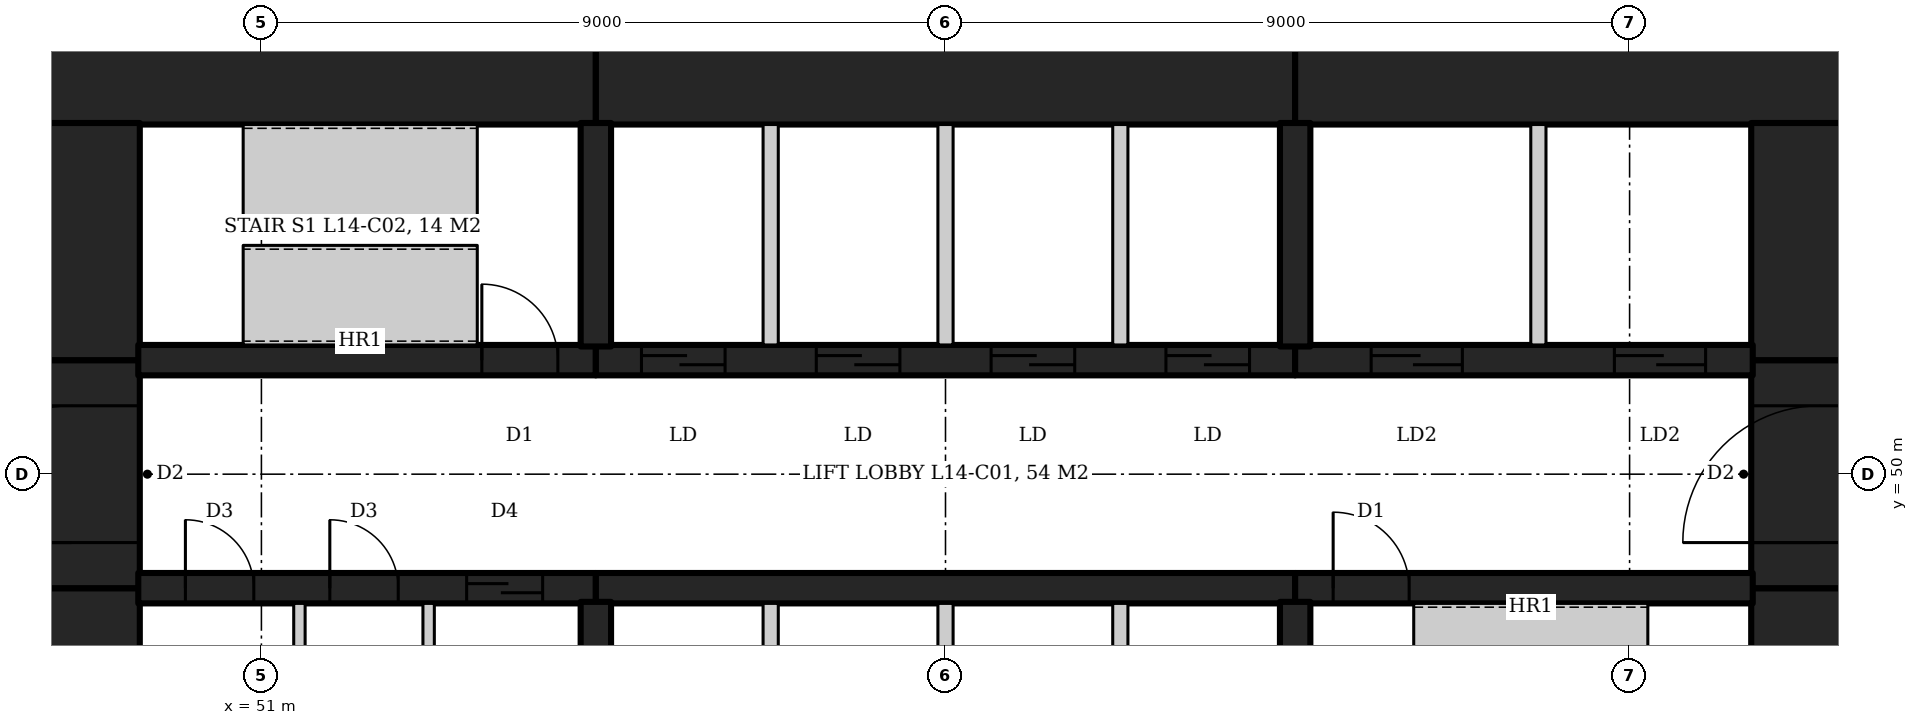
"""IFC4 building model, lengths in metres.
Left out: names, types, materials, properties, quantities, classifications, styles, units other than length and angle.
Written with IfcOpenShell. Run it as: python <this file> out.ifc"""

import sys

from ifc_helpers import new_model, si_unit, direction, frame, frame_2d, origin, place, context, subcontext, project, spatial, rectangle, extrude, element, fill, save


model = new_model("IFC4")
c1 = context("Model", 3, precision=1e-05, world=origin(), true_north=direction((0.0, 1.0)))
c2 = subcontext(c1, "Body", "Model", "MODEL_VIEW")
j1 = project(units=[si_unit("LENGTHUNIT", "METRE"), si_unit("PLANEANGLEUNIT", "RADIAN")], contexts=[c1])
p1 = place(None, origin())
s1 = spatial("IfcSite", under=j1, at=p1, CompositionType="ELEMENT")
p2 = place(p1, origin())
s2 = spatial("IfcBuilding", under=s1, at=p2, CompositionType="ELEMENT")
p3 = place(p2, frame((0.0, 0.0, 68.0)))
s3 = spatial("IfcBuildingStorey", under=s2, at=p3, CompositionType="ELEMENT", Elevation=68.0)
p4 = place(p3, frame((47.6, 55.5, 0.0), z_axis=(0.0, 0.0, 1.0), x_axis=(1.0, 0.0, 0.0)))
e1 = element("IfcWall", 1, at=p4, inside=s3, PredefinedType="SHEAR", context=c2, shape_type="SweptSolid", body=[
    extrude(rectangle(XDim=7.8, YDim=1.8, at=frame_2d((3.9, 0.0))), origin(), (0.0, 0.0, 1.0), 4.2),
])
p5 = place(p3, frame((55.4, 55.5, 0.0), z_axis=(0.0, 0.0, 1.0), x_axis=(1.0, 0.0, 0.0)))
e2 = element("IfcWall", 2, at=p5, inside=s3, PredefinedType="SHEAR", context=c2, shape_type="SweptSolid", body=[
    extrude(rectangle(XDim=9.2, YDim=1.8, at=frame_2d((4.6, 0.0))), origin(), (0.0, 0.0, 1.0), 4.2),
])
p6 = place(p3, frame((64.6, 55.5, 0.0), z_axis=(0.0, 0.0, 1.0), x_axis=(1.0, 0.0, 0.0)))
e3 = element("IfcWall", 3, at=p6, inside=s3, PredefinedType="SHEAR", context=c2, shape_type="SweptSolid", body=[
    extrude(rectangle(XDim=7.8, YDim=1.8, at=frame_2d((3.9, 0.0))), origin(), (0.0, 0.0, 1.0), 4.2),
])
p7 = place(p3, frame((71.5, 45.38, 0.0), z_axis=(0.0, 0.0, 1.0), x_axis=(0.0, 1.0, 0.0)))
e4 = element("IfcWall", 4, at=p7, inside=s3, PredefinedType="SHEAR", context=c2, shape_type="SweptSolid", body=[
    extrude(rectangle(XDim=3.12, YDim=1.8, at=frame_2d((1.56, 0.0))), origin(), (0.0, 0.0, 1.0), 4.2),
])
p8 = place(p3, frame((71.5, 48.5, 0.0), z_axis=(0.0, 0.0, 1.0), x_axis=(0.0, 1.0, 0.0)))
e5 = element("IfcWall", 5, at=p8, inside=s3, PredefinedType="SHEAR", context=c2, shape_type="SweptSolid", body=[
    extrude(rectangle(XDim=3.0, YDim=1.8, at=frame_2d((1.5, 0.0))), origin(), (0.0, 0.0, 1.0), 4.2),
])
p9 = place(p8, frame((0.6, 0.0, 0.0)))
e6 = element("IfcOpeningElement", 6, at=p9, cuts=e5, PredefinedType="OPENING", context=c2, shape_type="SweptSolid", body=[
    extrude(rectangle(XDim=1.8, YDim=2.1, at=frame_2d((0.9, 1.05))), frame((0.0, 0.91, 0.0), z_axis=(0.0, -1.0, 0.0), x_axis=(1.0, 0.0, 0.0)), (0.0, 0.0, 1.0), 1.82),
])
for number, where, z_axis, x_axis in (
    (7, (71.5, 51.5, 0.0), (0.0, 0.0, 1.0), (0.0, 1.0, 0.0)),
    (8, (48.5, 45.38, 0.0), (0.0, 0.0, 1.0), (0.0, 1.0, 0.0)),
):
    element("IfcWall", number, at=place(p3, frame(where, z_axis=z_axis, x_axis=x_axis)), inside=s3, PredefinedType="SHEAR", context=c2, shape_type="SweptSolid", body=[
        extrude(rectangle(XDim=3.12, YDim=1.8, at=frame_2d((1.56, 0.0))), origin(), (0.0, 0.0, 1.0), 4.2),
    ])
p10 = place(p3, frame((48.5, 48.5, 0.0), z_axis=(0.0, 0.0, 1.0), x_axis=(0.0, 1.0, 0.0)))
e9 = element("IfcWall", 9, at=p10, inside=s3, PredefinedType="SHEAR", context=c2, shape_type="SweptSolid", body=[
    extrude(rectangle(XDim=3.0, YDim=1.8, at=frame_2d((1.5, 0.0))), origin(), (0.0, 0.0, 1.0), 4.2),
])
p11 = place(p10, frame((0.6, 0.0, 0.0)))
e10 = element("IfcOpeningElement", 10, at=p11, cuts=e9, PredefinedType="OPENING", context=c2, shape_type="SweptSolid", body=[
    extrude(rectangle(XDim=1.8, YDim=2.1, at=frame_2d((0.9, 1.05))), frame((0.0, 0.91, 0.0), z_axis=(0.0, -1.0, 0.0), x_axis=(1.0, 0.0, 0.0)), (0.0, 0.0, 1.0), 1.82),
])
p12 = place(p3, frame((48.5, 51.5, 0.0), z_axis=(0.0, 0.0, 1.0), x_axis=(0.0, 1.0, 0.0)))
e11 = element("IfcWall", 11, at=p12, inside=s3, PredefinedType="SHEAR", context=c2, shape_type="SweptSolid", body=[
    extrude(rectangle(XDim=3.12, YDim=1.8, at=frame_2d((1.56, 0.0))), origin(), (0.0, 0.0, 1.0), 4.2),
])
p13 = place(p3, frame((49.38, 51.5, 0.0), z_axis=(0.0, 0.0, 1.0), x_axis=(1.0, 0.0, 0.0)))
e12 = element("IfcWall", 12, at=p13, inside=s3, PredefinedType="SHEAR", context=c2, shape_type="SweptSolid", body=[
    extrude(rectangle(XDim=6.02, YDim=0.4, at=frame_2d((3.01, 0.0))), origin(), (0.0, 0.0, 1.0), 4.2),
])
p14 = place(p13, frame((4.52, 0.0, 0.0)))
e13 = element("IfcOpeningElement", 13, at=p14, cuts=e12, PredefinedType="OPENING", context=c2, shape_type="SweptSolid", body=[
    extrude(rectangle(XDim=1.0, YDim=2.1, at=frame_2d((0.5, 1.05))), frame((0.0, 0.21, 0.0), z_axis=(0.0, -1.0, 0.0), x_axis=(1.0, 0.0, 0.0)), (0.0, 0.0, 1.0), 0.42),
])
p15 = place(p3, frame((55.4, 51.5, 0.0), z_axis=(0.0, 0.0, 1.0), x_axis=(1.0, 0.0, 0.0)))
e14 = element("IfcWall", 14, at=p15, inside=s3, PredefinedType="SHEAR", context=c2, shape_type="SweptSolid", body=[
    extrude(rectangle(XDim=9.2, YDim=0.4, at=frame_2d((4.6, 0.0))), origin(), (0.0, 0.0, 1.0), 4.2),
])
p16 = place(p15, frame((0.6, 0.0, 0.0)))
e15 = element("IfcOpeningElement", 15, at=p16, cuts=e14, PredefinedType="OPENING", context=c2, shape_type="SweptSolid", body=[
    extrude(rectangle(XDim=1.1, YDim=2.1, at=frame_2d((0.55, 1.05))), frame((0.0, 0.21, 0.0), z_axis=(0.0, -1.0, 0.0), x_axis=(1.0, 0.0, 0.0)), (0.0, 0.0, 1.0), 0.42),
])
p17 = place(p15, frame((2.9, 0.0, 0.0)))
e16 = element("IfcOpeningElement", 16, at=p17, cuts=e14, PredefinedType="OPENING", context=c2, shape_type="SweptSolid", body=[
    extrude(rectangle(XDim=1.1, YDim=2.1, at=frame_2d((0.55, 1.05))), frame((0.0, 0.21, 0.0), z_axis=(0.0, -1.0, 0.0), x_axis=(1.0, 0.0, 0.0)), (0.0, 0.0, 1.0), 0.42),
])
p18 = place(p15, frame((5.2, 0.0, 0.0)))
e17 = element("IfcOpeningElement", 17, at=p18, cuts=e14, PredefinedType="OPENING", context=c2, shape_type="SweptSolid", body=[
    extrude(rectangle(XDim=1.1, YDim=2.1, at=frame_2d((0.55, 1.05))), frame((0.0, 0.21, 0.0), z_axis=(0.0, -1.0, 0.0), x_axis=(1.0, 0.0, 0.0)), (0.0, 0.0, 1.0), 0.42),
])
p19 = place(p15, frame((7.5, 0.0, 0.0)))
e18 = element("IfcOpeningElement", 18, at=p19, cuts=e14, PredefinedType="OPENING", context=c2, shape_type="SweptSolid", body=[
    extrude(rectangle(XDim=1.1, YDim=2.1, at=frame_2d((0.55, 1.05))), frame((0.0, 0.21, 0.0), z_axis=(0.0, -1.0, 0.0), x_axis=(1.0, 0.0, 0.0)), (0.0, 0.0, 1.0), 0.42),
])
p20 = place(p3, frame((64.6, 51.5, 0.0), z_axis=(0.0, 0.0, 1.0), x_axis=(1.0, 0.0, 0.0)))
e19 = element("IfcWall", 19, at=p20, inside=s3, PredefinedType="SHEAR", context=c2, shape_type="SweptSolid", body=[
    extrude(rectangle(XDim=6.02, YDim=0.4, at=frame_2d((3.01, 0.0))), origin(), (0.0, 0.0, 1.0), 4.2),
])
p21 = place(p20, frame((1.0, 0.0, 0.0)))
e20 = element("IfcOpeningElement", 20, at=p21, cuts=e19, PredefinedType="OPENING", context=c2, shape_type="SweptSolid", body=[
    extrude(rectangle(XDim=1.2, YDim=2.1, at=frame_2d((0.6, 1.05))), frame((0.0, 0.21, 0.0), z_axis=(0.0, -1.0, 0.0), x_axis=(1.0, 0.0, 0.0)), (0.0, 0.0, 1.0), 0.42),
])
p22 = place(p20, frame((4.2, 0.0, 0.0)))
e21 = element("IfcOpeningElement", 21, at=p22, cuts=e19, PredefinedType="OPENING", context=c2, shape_type="SweptSolid", body=[
    extrude(rectangle(XDim=1.2, YDim=2.1, at=frame_2d((0.6, 1.05))), frame((0.0, 0.21, 0.0), z_axis=(0.0, -1.0, 0.0), x_axis=(1.0, 0.0, 0.0)), (0.0, 0.0, 1.0), 0.42),
])
p23 = place(p3, frame((49.38, 48.5, 0.0), z_axis=(0.0, 0.0, 1.0), x_axis=(1.0, 0.0, 0.0)))
e22 = element("IfcWall", 22, at=p23, inside=s3, PredefinedType="SHEAR", context=c2, shape_type="SweptSolid", body=[
    extrude(rectangle(XDim=6.02, YDim=0.4, at=frame_2d((3.01, 0.0))), origin(), (0.0, 0.0, 1.0), 4.2),
])
p24 = place(p23, frame((0.62, 0.0, 0.0)))
e23 = element("IfcOpeningElement", 23, at=p24, cuts=e22, PredefinedType="OPENING", context=c2, shape_type="SweptSolid", body=[
    extrude(rectangle(XDim=0.9, YDim=2.1, at=frame_2d((0.45, 1.05))), frame((0.0, 0.21, 0.0), z_axis=(0.0, -1.0, 0.0), x_axis=(1.0, 0.0, 0.0)), (0.0, 0.0, 1.0), 0.42),
])
p25 = place(p23, frame((2.52, 0.0, 0.0)))
e24 = element("IfcOpeningElement", 24, at=p25, cuts=e22, PredefinedType="OPENING", context=c2, shape_type="SweptSolid", body=[
    extrude(rectangle(XDim=0.9, YDim=2.1, at=frame_2d((0.45, 1.05))), frame((0.0, 0.21, 0.0), z_axis=(0.0, -1.0, 0.0), x_axis=(1.0, 0.0, 0.0)), (0.0, 0.0, 1.0), 0.42),
])
p26 = place(p23, frame((4.32, 0.0, 0.0)))
e25 = element("IfcOpeningElement", 25, at=p26, cuts=e22, PredefinedType="OPENING", context=c2, shape_type="SweptSolid", body=[
    extrude(rectangle(XDim=1.0, YDim=2.1, at=frame_2d((0.5, 1.05))), frame((0.0, 0.21, 0.0), z_axis=(0.0, -1.0, 0.0), x_axis=(1.0, 0.0, 0.0)), (0.0, 0.0, 1.0), 0.42),
])
p27 = place(p3, frame((55.4, 48.5, 0.0), z_axis=(0.0, 0.0, 1.0), x_axis=(1.0, 0.0, 0.0)))
e26 = element("IfcWall", 26, at=p27, inside=s3, PredefinedType="SHEAR", context=c2, shape_type="SweptSolid", body=[
    extrude(rectangle(XDim=9.2, YDim=0.4, at=frame_2d((4.6, 0.0))), origin(), (0.0, 0.0, 1.0), 4.2),
])
p28 = place(p3, frame((64.6, 48.5, 0.0), z_axis=(0.0, 0.0, 1.0), x_axis=(1.0, 0.0, 0.0)))
e27 = element("IfcWall", 27, at=p28, inside=s3, PredefinedType="SHEAR", context=c2, shape_type="SweptSolid", body=[
    extrude(rectangle(XDim=6.02, YDim=0.4, at=frame_2d((3.01, 0.0))), origin(), (0.0, 0.0, 1.0), 4.2),
])
p29 = place(p28, frame((0.5, 0.0, 0.0)))
e28 = element("IfcOpeningElement", 28, at=p29, cuts=e27, PredefinedType="OPENING", context=c2, shape_type="SweptSolid", body=[
    extrude(rectangle(XDim=1.0, YDim=2.1, at=frame_2d((0.5, 1.05))), frame((0.0, 0.21, 0.0), z_axis=(0.0, -1.0, 0.0), x_axis=(1.0, 0.0, 0.0)), (0.0, 0.0, 1.0), 0.42),
])
for number, where, z_axis, x_axis in (
    (29, (55.4, 51.68, 0.0), (0.0, 0.0, 1.0), (0.0, 1.0, 0.0)),
    (30, (64.6, 51.68, 0.0), (0.0, 0.0, 1.0), (0.0, 1.0, 0.0)),
    (31, (55.4, 48.32, 0.0), (0.0, 0.0, 1.0), (0.0, -1.0, 0.0)),
    (32, (64.6, 48.32, 0.0), (0.0, 0.0, 1.0), (0.0, -1.0, 0.0)),
):
    element("IfcWall", number, at=place(p3, frame(where, z_axis=z_axis, x_axis=x_axis)), inside=s3, PredefinedType="SHEAR", context=c2, shape_type="SweptSolid", body=[
        extrude(rectangle(XDim=2.94, YDim=0.4, at=frame_2d((1.47, 0.0))), origin(), (0.0, 0.0, 1.0), 4.2),
    ])
for number, where, z_axis, x_axis in (
    (33, (57.7, 51.7, 0.0), (0.0, 0.0, 1.0), (0.0, 1.0, 0.0)),
    (34, (60.0, 51.7, 0.0), (0.0, 0.0, 1.0), (0.0, 1.0, 0.0)),
    (35, (62.3, 51.7, 0.0), (0.0, 0.0, 1.0), (0.0, 1.0, 0.0)),
    (36, (57.7, 45.4, 0.0), (0.0, 0.0, 1.0), (0.0, 1.0, 0.0)),
    (37, (60.0, 45.4, 0.0), (0.0, 0.0, 1.0), (0.0, 1.0, 0.0)),
    (38, (62.3, 45.4, 0.0), (0.0, 0.0, 1.0), (0.0, 1.0, 0.0)),
    (39, (67.8, 51.7, 0.0), (0.0, 0.0, 1.0), (0.0, 1.0, 0.0)),
):
    element("IfcWall", number, at=place(p3, frame(where, z_axis=z_axis, x_axis=x_axis)), inside=s3, PredefinedType="PARTITIONING", context=c2, shape_type="SweptSolid", body=[
        extrude(rectangle(XDim=2.9, YDim=0.2, at=frame_2d((1.45, 0.0))), origin(), (0.0, 0.0, 1.0), 4.2),
    ])
for number, where, z_axis, x_axis in (
    (40, (51.5, 45.4, 0.0), (0.0, 0.0, 1.0), (0.0, 1.0, 0.0)),
    (41, (53.2, 45.4, 0.0), (0.0, 0.0, 1.0), (0.0, 1.0, 0.0)),
):
    element("IfcWall", number, at=place(p3, frame(where, z_axis=z_axis, x_axis=x_axis)), inside=s3, PredefinedType="PARTITIONING", context=c2, shape_type="SweptSolid", body=[
        extrude(rectangle(XDim=2.9, YDim=0.15, at=frame_2d((1.45, 0.0))), origin(), (0.0, 0.0, 1.0), 4.04),
    ])
p30 = place(p14, origin())
e42 = element("IfcDoor", 42, at=p30, inside=s3, OperationType="SINGLE_SWING_LEFT", PredefinedType="DOOR", context=c2, shape_type="SweptSolid", body=[
    extrude(rectangle(XDim=1.0, YDim=2.1, at=frame_2d((0.5, 1.05))), frame((0.0, 0.025, 0.0), z_axis=(0.0, -1.0, 0.0), x_axis=(1.0, 0.0, 0.0)), (0.0, 0.0, 1.0), 0.05),
])
fill(e13, e42)
p31 = place(p29, origin())
e43 = element("IfcDoor", 43, at=p31, inside=s3, OperationType="SINGLE_SWING_LEFT", PredefinedType="DOOR", context=c2, shape_type="SweptSolid", body=[
    extrude(rectangle(XDim=1.0, YDim=2.1, at=frame_2d((0.5, 1.05))), frame((0.0, 0.025, 0.0), z_axis=(0.0, -1.0, 0.0), x_axis=(1.0, 0.0, 0.0)), (0.0, 0.0, 1.0), 0.05),
])
fill(e28, e43)
p32 = place(p21, origin())
e44 = element("IfcDoor", 44, at=p32, inside=s3, OperationType="SLIDING_TO_LEFT", PredefinedType="DOOR", context=c2, shape_type="SweptSolid", body=[
    extrude(rectangle(XDim=1.2, YDim=2.1, at=frame_2d((0.6, 1.05))), frame((0.0, 0.025, 0.0), z_axis=(0.0, -1.0, 0.0), x_axis=(1.0, 0.0, 0.0)), (0.0, 0.0, 1.0), 0.05),
])
fill(e20, e44)
p33 = place(p22, origin())
e45 = element("IfcDoor", 45, at=p33, inside=s3, OperationType="SLIDING_TO_LEFT", PredefinedType="DOOR", context=c2, shape_type="SweptSolid", body=[
    extrude(rectangle(XDim=1.2, YDim=2.1, at=frame_2d((0.6, 1.05))), frame((0.0, 0.025, 0.0), z_axis=(0.0, -1.0, 0.0), x_axis=(1.0, 0.0, 0.0)), (0.0, 0.0, 1.0), 0.05),
])
fill(e21, e45)
p34 = place(p16, origin())
e46 = element("IfcDoor", 46, at=p34, inside=s3, OperationType="SLIDING_TO_LEFT", PredefinedType="DOOR", context=c2, shape_type="SweptSolid", body=[
    extrude(rectangle(XDim=1.1, YDim=2.1, at=frame_2d((0.55, 1.05))), frame((0.0, 0.025, 0.0), z_axis=(0.0, -1.0, 0.0), x_axis=(1.0, 0.0, 0.0)), (0.0, 0.0, 1.0), 0.05),
])
fill(e15, e46)
p35 = place(p17, origin())
e47 = element("IfcDoor", 47, at=p35, inside=s3, OperationType="SLIDING_TO_LEFT", PredefinedType="DOOR", context=c2, shape_type="SweptSolid", body=[
    extrude(rectangle(XDim=1.1, YDim=2.1, at=frame_2d((0.55, 1.05))), frame((0.0, 0.025, 0.0), z_axis=(0.0, -1.0, 0.0), x_axis=(1.0, 0.0, 0.0)), (0.0, 0.0, 1.0), 0.05),
])
fill(e16, e47)
p36 = place(p18, origin())
e48 = element("IfcDoor", 48, at=p36, inside=s3, OperationType="SLIDING_TO_LEFT", PredefinedType="DOOR", context=c2, shape_type="SweptSolid", body=[
    extrude(rectangle(XDim=1.1, YDim=2.1, at=frame_2d((0.55, 1.05))), frame((0.0, 0.025, 0.0), z_axis=(0.0, -1.0, 0.0), x_axis=(1.0, 0.0, 0.0)), (0.0, 0.0, 1.0), 0.05),
])
fill(e17, e48)
p37 = place(p19, origin())
e49 = element("IfcDoor", 49, at=p37, inside=s3, OperationType="SLIDING_TO_LEFT", PredefinedType="DOOR", context=c2, shape_type="SweptSolid", body=[
    extrude(rectangle(XDim=1.1, YDim=2.1, at=frame_2d((0.55, 1.05))), frame((0.0, 0.025, 0.0), z_axis=(0.0, -1.0, 0.0), x_axis=(1.0, 0.0, 0.0)), (0.0, 0.0, 1.0), 0.05),
])
fill(e18, e49)
p38 = place(p24, origin())
e50 = element("IfcDoor", 50, at=p38, inside=s3, OperationType="SINGLE_SWING_RIGHT", PredefinedType="DOOR", context=c2, shape_type="SweptSolid", body=[
    extrude(rectangle(XDim=0.9, YDim=2.1, at=frame_2d((0.45, 1.05))), frame((0.0, 0.025, 0.0), z_axis=(0.0, -1.0, 0.0), x_axis=(1.0, 0.0, 0.0)), (0.0, 0.0, 1.0), 0.05),
])
fill(e23, e50)
p39 = place(p25, origin())
e51 = element("IfcDoor", 51, at=p39, inside=s3, OperationType="SINGLE_SWING_RIGHT", PredefinedType="DOOR", context=c2, shape_type="SweptSolid", body=[
    extrude(rectangle(XDim=0.9, YDim=2.1, at=frame_2d((0.45, 1.05))), frame((0.0, 0.025, 0.0), z_axis=(0.0, -1.0, 0.0), x_axis=(1.0, 0.0, 0.0)), (0.0, 0.0, 1.0), 0.05),
])
fill(e24, e51)
p40 = place(p26, origin())
e52 = element("IfcDoor", 52, at=p40, inside=s3, OperationType="SLIDING_TO_LEFT", PredefinedType="DOOR", context=c2, shape_type="SweptSolid", body=[
    extrude(rectangle(XDim=1.0, YDim=2.1, at=frame_2d((0.5, 1.05))), frame((0.0, 0.025, 0.0), z_axis=(0.0, -1.0, 0.0), x_axis=(1.0, 0.0, 0.0)), (0.0, 0.0, 1.0), 0.05),
])
fill(e25, e52)
p41 = place(p9, origin())
e53 = element("IfcDoor", 53, at=p41, inside=s3, OperationType="DOUBLE_DOOR_DOUBLE_SWING", PredefinedType="DOOR", context=c2, shape_type="SweptSolid", body=[
    extrude(rectangle(XDim=1.8, YDim=2.1, at=frame_2d((0.9, 1.05))), frame((0.0, 0.025, 0.0), z_axis=(0.0, -1.0, 0.0), x_axis=(1.0, 0.0, 0.0)), (0.0, 0.0, 1.0), 0.05),
])
fill(e6, e53)
p42 = place(p11, origin())
e54 = element("IfcDoor", 54, at=p42, inside=s3, OperationType="DOUBLE_DOOR_DOUBLE_SWING", PredefinedType="DOOR", context=c2, shape_type="SweptSolid", body=[
    extrude(rectangle(XDim=1.8, YDim=2.1, at=frame_2d((0.9, 1.05))), frame((0.0, 0.025, 0.0), z_axis=(0.0, -1.0, 0.0), x_axis=(1.0, 0.0, 0.0)), (0.0, 0.0, 1.0), 0.05),
])
fill(e10, e54)
save(model, sys.argv[1])
